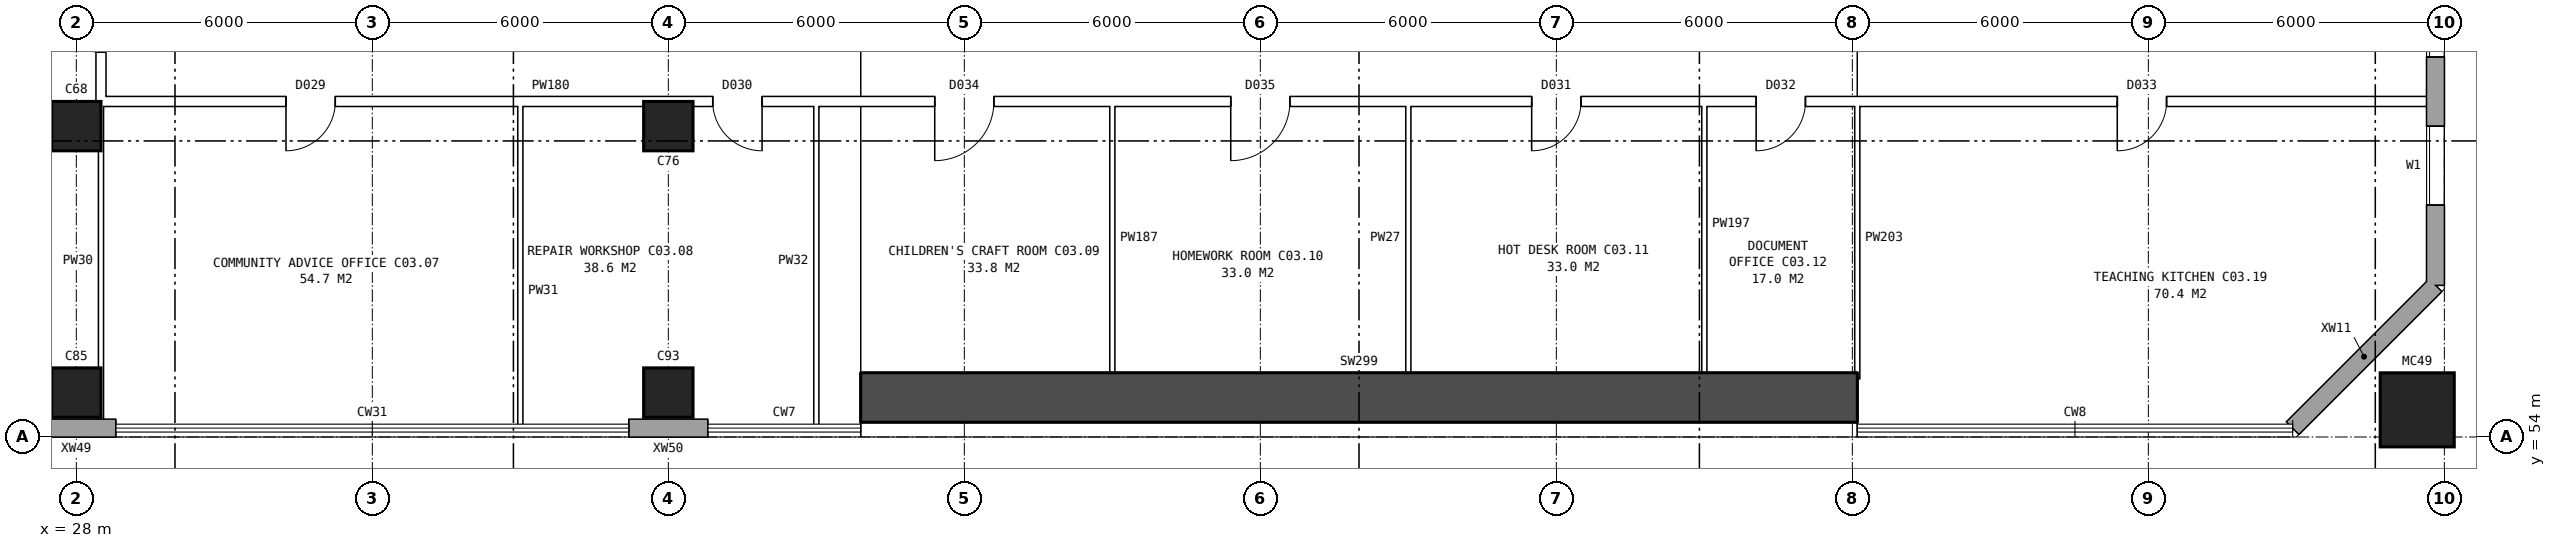
"""IFC4 building model, lengths in metres.
Left out: names, types, materials, properties, quantities, classifications, styles, units other than length and angle.
Written with IfcOpenShell. Run it as: python <this file> out.ifc"""

import sys

from ifc_helpers import new_model, si_unit, direction, frame, frame_2d, origin, origin_2d, place, context, subcontext, project, spatial, rectangle, hollow_rectangle, extrude, element, fill, save


model = new_model("IFC4")
c1 = context("Model", 3, precision=1e-05, world=origin(), true_north=direction((0.0, 1.0)))
c2 = subcontext(c1, "Body", "Model", "MODEL_VIEW")
j1 = project(units=[si_unit("LENGTHUNIT", "METRE"), si_unit("PLANEANGLEUNIT", "RADIAN")], contexts=[c1])
p1 = place(None, origin())
s1 = spatial("IfcSite", under=j1, at=p1, CompositionType="ELEMENT")
p2 = place(p1, origin())
s2 = spatial("IfcBuilding", under=s1, at=p2, CompositionType="ELEMENT")
p3 = place(p2, frame((0.0, 0.0, 14.7)))
s3 = spatial("IfcBuildingStorey", under=s2, at=p3, CompositionType="ELEMENT", Elevation=14.7)
p4 = place(p3, frame((43.9, 54.8, 0.0), z_axis=(0.0, 0.0, 1.0), x_axis=(1.0, 0.0, 0.0)))
e1 = element("IfcWall", 1, at=p4, inside=s3, PredefinedType="SHEAR", context=c2, shape_type="SweptSolid", body=[
    extrude(rectangle(XDim=20.2, YDim=1.0, at=frame_2d((10.1, 0.0))), origin(), (0.0, 0.0, 1.0), 4.0),
])
for number, where, z_axis, x_axis in (
    (2, (28.0, 54.9, 0.0), (0.0, 0.0, 1.0), (1.0, 0.0, 0.0)),
    (3, (28.0, 60.3, 0.0), (0.0, 0.0, 1.0), (1.0, 0.0, 0.0)),
    (4, (40.0, 54.9, 0.0), (0.0, 0.0, 1.0), (1.0, 0.0, 0.0)),
    (5, (40.0, 60.3, 0.0), (0.0, 0.0, 1.0), (1.0, 0.0, 0.0)),
):
    element("IfcColumn", number, at=place(p3, frame(where, z_axis=z_axis, x_axis=x_axis)), inside=s3, PredefinedType="COLUMN", context=c2, shape_type="SweptSolid", body=[
        extrude(rectangle(XDim=1.0, YDim=1.0, at=origin_2d()), origin(), (0.0, 0.0, 1.0), 4.0),
    ])
p5 = place(p3, frame((75.45, 54.55, 0.0), z_axis=(0.0, 0.0, 1.0), x_axis=(1.0, 0.0, 0.0)))
e6 = element("IfcColumn", 6, at=p5, inside=s3, PredefinedType="COLUMN", context=c2, shape_type="SweptSolid", body=[
    extrude(hollow_rectangle(XDim=1.5, YDim=1.5, WallThickness=0.08, at=origin_2d()), origin(), (0.0, 0.0, 1.0), 4.8),
])
for number, where, z_axis, x_axis in (
    (7, (27.2, 54.18, 0.0), (0.0, 0.0, 1.0), (1.0, 0.0, 0.0)),
    (8, (39.2, 54.18, 0.0), (0.0, 0.0, 1.0), (1.0, 0.0, 0.0)),
):
    element("IfcWall", number, at=place(p3, frame(where, z_axis=z_axis, x_axis=x_axis)), inside=s3, PredefinedType="STANDARD", context=c2, shape_type="SweptSolid", body=[
        extrude(rectangle(XDim=1.6, YDim=0.36, at=frame_2d((0.8, 0.0))), origin(), (0.0, 0.0, 1.0), 4.0),
    ])
p6 = place(p3, frame((72.925, 54.18, 0.0), z_axis=(0.0, 0.0, 1.0), x_axis=(0.707106781187, 0.707106781187, 0.0)))
e9 = element("IfcWall", 9, at=p6, inside=s3, PredefinedType="STANDARD", context=c2, shape_type="SweptSolid", body=[
    extrude(rectangle(XDim=4.094, YDim=0.36, at=frame_2d((2.047, 0.0))), origin(), (0.0, 0.0, 1.0), 4.0),
])
p7 = place(p3, frame((75.82, 57.075, 0.0), z_axis=(0.0, 0.0, 1.0), x_axis=(0.0, 1.0, 0.0)))
e10 = element("IfcWall", 10, at=p7, inside=s3, PredefinedType="STANDARD", context=c2, shape_type="SweptSolid", body=[
    extrude(rectangle(XDim=25.851, YDim=0.36, at=frame_2d((12.925, 0.0))), origin(), (0.0, 0.0, 1.0), 4.0),
])
p8 = place(p7, frame((1.625, 0.0, 0.8)))
e11 = element("IfcOpeningElement", 11, at=p8, cuts=e10, PredefinedType="OPENING", context=c2, shape_type="SweptSolid", body=[
    extrude(rectangle(XDim=1.6, YDim=1.8, at=frame_2d((0.8, 0.9))), frame((0.0, 0.19, 0.0), z_axis=(0.0, -1.0, 0.0), x_axis=(1.0, 0.0, 0.0)), (0.0, 0.0, 1.0), 0.38),
])
p9 = place(p7, frame((4.625, 0.0, 0.8)))
e12 = element("IfcOpeningElement", 12, at=p9, cuts=e10, PredefinedType="OPENING", context=c2, shape_type="SweptSolid", body=[
    extrude(rectangle(XDim=1.6, YDim=1.8, at=frame_2d((0.8, 0.9))), frame((0.0, 0.19, 0.0), z_axis=(0.0, -1.0, 0.0), x_axis=(1.0, 0.0, 0.0)), (0.0, 0.0, 1.0), 0.38),
])
p10 = place(p7, frame((19.625, 0.0, 0.8)))
e13 = element("IfcOpeningElement", 13, at=p10, cuts=e10, PredefinedType="OPENING", context=c2, shape_type="SweptSolid", body=[
    extrude(rectangle(XDim=1.6, YDim=1.8, at=frame_2d((0.8, 0.9))), frame((0.0, 0.19, 0.0), z_axis=(0.0, -1.0, 0.0), x_axis=(1.0, 0.0, 0.0)), (0.0, 0.0, 1.0), 0.38),
])
p11 = place(p7, frame((22.625, 0.0, 0.8)))
e14 = element("IfcOpeningElement", 14, at=p11, cuts=e10, PredefinedType="OPENING", context=c2, shape_type="SweptSolid", body=[
    extrude(rectangle(XDim=1.6, YDim=1.8, at=frame_2d((0.8, 0.9))), frame((0.0, 0.19, 0.0), z_axis=(0.0, -1.0, 0.0), x_axis=(1.0, 0.0, 0.0)), (0.0, 0.0, 1.0), 0.38),
])
p12 = place(p3, frame((28.4, 60.8, 0.0), z_axis=(0.0, 0.0, 1.0), x_axis=(1.0, 0.0, 0.0)))
e15 = element("IfcWall", 15, at=p12, inside=s3, PredefinedType="PARTITIONING", context=c2, shape_type="SweptSolid", body=[
    extrude(rectangle(XDim=47.36, YDim=0.2, at=frame_2d((23.68, 0.0))), origin(), (0.0, 0.0, 1.0), 4.0),
])
p13 = place(p12, frame((3.85, 0.0, 0.0)))
e16 = element("IfcOpeningElement", 16, at=p13, cuts=e15, PredefinedType="OPENING", context=c2, shape_type="SweptSolid", body=[
    extrude(rectangle(XDim=1.0, YDim=2.1, at=frame_2d((0.5, 1.05))), frame((0.0, 0.11, 0.0), z_axis=(0.0, -1.0, 0.0), x_axis=(1.0, 0.0, 0.0)), (0.0, 0.0, 1.0), 0.22),
])
p14 = place(p12, frame((12.5, 0.0, 0.0)))
e17 = element("IfcOpeningElement", 17, at=p14, cuts=e15, PredefinedType="OPENING", context=c2, shape_type="SweptSolid", body=[
    extrude(rectangle(XDim=1.0, YDim=2.1, at=frame_2d((0.5, 1.05))), frame((0.0, 0.11, 0.0), z_axis=(0.0, -1.0, 0.0), x_axis=(1.0, 0.0, 0.0)), (0.0, 0.0, 1.0), 0.22),
])
p15 = place(p12, frame((17.0, 0.0, 0.0)))
e18 = element("IfcOpeningElement", 18, at=p15, cuts=e15, PredefinedType="OPENING", context=c2, shape_type="SweptSolid", body=[
    extrude(rectangle(XDim=1.2, YDim=2.1, at=frame_2d((0.6, 1.05))), frame((0.0, 0.11, 0.0), z_axis=(0.0, -1.0, 0.0), x_axis=(1.0, 0.0, 0.0)), (0.0, 0.0, 1.0), 0.22),
])
p16 = place(p12, frame((23.0, 0.0, 0.0)))
e19 = element("IfcOpeningElement", 19, at=p16, cuts=e15, PredefinedType="OPENING", context=c2, shape_type="SweptSolid", body=[
    extrude(rectangle(XDim=1.2, YDim=2.1, at=frame_2d((0.6, 1.05))), frame((0.0, 0.11, 0.0), z_axis=(0.0, -1.0, 0.0), x_axis=(1.0, 0.0, 0.0)), (0.0, 0.0, 1.0), 0.22),
])
p17 = place(p12, frame((29.1, 0.0, 0.0)))
e20 = element("IfcOpeningElement", 20, at=p17, cuts=e15, PredefinedType="OPENING", context=c2, shape_type="SweptSolid", body=[
    extrude(rectangle(XDim=1.0, YDim=2.1, at=frame_2d((0.5, 1.05))), frame((0.0, 0.11, 0.0), z_axis=(0.0, -1.0, 0.0), x_axis=(1.0, 0.0, 0.0)), (0.0, 0.0, 1.0), 0.22),
])
p18 = place(p12, frame((33.65, 0.0, 0.0)))
e21 = element("IfcOpeningElement", 21, at=p18, cuts=e15, PredefinedType="OPENING", context=c2, shape_type="SweptSolid", body=[
    extrude(rectangle(XDim=1.0, YDim=2.1, at=frame_2d((0.5, 1.05))), frame((0.0, 0.11, 0.0), z_axis=(0.0, -1.0, 0.0), x_axis=(1.0, 0.0, 0.0)), (0.0, 0.0, 1.0), 0.22),
])
p19 = place(p12, frame((40.97, 0.0, 0.0)))
e22 = element("IfcOpeningElement", 22, at=p19, cuts=e15, PredefinedType="OPENING", context=c2, shape_type="SweptSolid", body=[
    extrude(rectangle(XDim=1.0, YDim=2.1, at=frame_2d((0.5, 1.05))), frame((0.0, 0.11, 0.0), z_axis=(0.0, -1.0, 0.0), x_axis=(1.0, 0.0, 0.0)), (0.0, 0.0, 1.0), 0.22),
])
p20 = place(p3, frame((28.5, 60.7, 0.0), z_axis=(0.0, 0.0, 1.0), x_axis=(0.0, 1.0, 0.0)))
e23 = element("IfcWall", 23, at=p20, inside=s3, PredefinedType="PARTITIONING", context=c2, shape_type="SweptSolid", body=[
    extrude(rectangle(XDim=18.6, YDim=0.2, at=frame_2d((9.3, 0.0))), origin(), (0.0, 0.0, 1.0), 4.0),
])
p21 = place(p20, frame((1.1, 0.0, 0.0)))
e24 = element("IfcOpeningElement", 24, at=p21, cuts=e23, PredefinedType="OPENING", context=c2, shape_type="SweptSolid", body=[
    extrude(rectangle(XDim=1.2, YDim=2.1, at=frame_2d((0.6, 1.05))), frame((0.0, 0.11, 0.0), z_axis=(0.0, -1.0, 0.0), x_axis=(1.0, 0.0, 0.0)), (0.0, 0.0, 1.0), 0.22),
])
p22 = place(p20, frame((7.2, 0.0, 0.0)))
e25 = element("IfcOpeningElement", 25, at=p22, cuts=e23, PredefinedType="OPENING", context=c2, shape_type="SweptSolid", body=[
    extrude(rectangle(XDim=1.2, YDim=2.1, at=frame_2d((0.6, 1.05))), frame((0.0, 0.11, 0.0), z_axis=(0.0, -1.0, 0.0), x_axis=(1.0, 0.0, 0.0)), (0.0, 0.0, 1.0), 0.22),
])
p23 = place(p20, frame((14.9, 0.0, 0.0)))
e26 = element("IfcOpeningElement", 26, at=p23, cuts=e23, PredefinedType="OPENING", context=c2, shape_type="SweptSolid", body=[
    extrude(rectangle(XDim=1.0, YDim=2.1, at=frame_2d((0.5, 1.05))), frame((0.0, 0.11, 0.0), z_axis=(0.0, -1.0, 0.0), x_axis=(1.0, 0.0, 0.0)), (0.0, 0.0, 1.0), 0.22),
])
for number, where, z_axis, x_axis in (
    (27, (28.5, 54.24, 0.0), (0.0, 0.0, 1.0), (0.0, 1.0, 0.0)),
    (28, (37.0, 54.24, 0.0), (0.0, 0.0, 1.0), (0.0, 1.0, 0.0)),
    (29, (43.0, 54.24, 0.0), (0.0, 0.0, 1.0), (0.0, 1.0, 0.0)),
):
    element("IfcWall", number, at=place(p3, frame(where, z_axis=z_axis, x_axis=x_axis)), inside=s3, PredefinedType="PARTITIONING", context=c2, shape_type="SweptSolid", body=[
        extrude(rectangle(XDim=6.66, YDim=0.1, at=frame_2d((3.33, 0.0))), origin(), (0.0, 0.0, 1.0), 4.0),
    ])
for number, where, z_axis, x_axis in (
    (30, (49.0, 55.18, 0.0), (0.0, 0.0, 1.0), (0.0, 1.0, 0.0)),
    (31, (55.0, 55.18, 0.0), (0.0, 0.0, 1.0), (0.0, 1.0, 0.0)),
    (32, (61.0, 55.18, 0.0), (0.0, 0.0, 1.0), (0.0, 1.0, 0.0)),
    (33, (64.1, 55.18, 0.0), (0.0, 0.0, 1.0), (0.0, 1.0, 0.0)),
):
    element("IfcWall", number, at=place(p3, frame(where, z_axis=z_axis, x_axis=x_axis)), inside=s3, PredefinedType="PARTITIONING", context=c2, shape_type="SweptSolid", body=[
        extrude(rectangle(XDim=5.72, YDim=0.1, at=frame_2d((2.86, 0.0))), origin(), (0.0, 0.0, 1.0), 4.0),
    ])
p24 = place(p8, origin())
e34 = element("IfcWindow", 34, at=p24, inside=s3, PartitioningType="SINGLE_PANEL", PredefinedType="WINDOW", context=c2, shape_type="SweptSolid", body=[
    extrude(rectangle(XDim=1.6, YDim=1.8, at=frame_2d((0.8, 0.9))), frame((0.0, 0.15, 0.0), z_axis=(0.0, -1.0, 0.0), x_axis=(1.0, 0.0, 0.0)), (0.0, 0.0, 1.0), 0.06),
])
fill(e11, e34)
p25 = place(p9, origin())
e35 = element("IfcWindow", 35, at=p25, inside=s3, PartitioningType="SINGLE_PANEL", PredefinedType="WINDOW", context=c2, shape_type="SweptSolid", body=[
    extrude(rectangle(XDim=1.6, YDim=1.8, at=frame_2d((0.8, 0.9))), frame((0.0, 0.15, 0.0), z_axis=(0.0, -1.0, 0.0), x_axis=(1.0, 0.0, 0.0)), (0.0, 0.0, 1.0), 0.06),
])
fill(e12, e35)
p26 = place(p13, frame((1.0, 0.0, 0.0), z_axis=(0.0, 0.0, 1.0), x_axis=(-1.0, 0.0, 0.0)))
e36 = element("IfcDoor", 36, at=p26, inside=s3, OperationType="SINGLE_SWING_RIGHT", PredefinedType="DOOR", context=c2, shape_type="SweptSolid", body=[
    extrude(rectangle(XDim=1.0, YDim=2.1, at=frame_2d((0.5, 1.05))), frame((0.0, 0.025, 0.0), z_axis=(0.0, -1.0, 0.0), x_axis=(1.0, 0.0, 0.0)), (0.0, 0.0, 1.0), 0.05),
])
fill(e16, e36)
p27 = place(p14, frame((1.0, 0.0, 0.0), z_axis=(0.0, 0.0, 1.0), x_axis=(-1.0, 0.0, 0.0)))
e37 = element("IfcDoor", 37, at=p27, inside=s3, OperationType="SINGLE_SWING_LEFT", PredefinedType="DOOR", context=c2, shape_type="SweptSolid", body=[
    extrude(rectangle(XDim=1.0, YDim=2.1, at=frame_2d((0.5, 1.05))), frame((0.0, 0.025, 0.0), z_axis=(0.0, -1.0, 0.0), x_axis=(1.0, 0.0, 0.0)), (0.0, 0.0, 1.0), 0.05),
])
fill(e17, e37)
p28 = place(p15, frame((1.2, 0.0, 0.0), z_axis=(0.0, 0.0, 1.0), x_axis=(-1.0, 0.0, 0.0)))
e38 = element("IfcDoor", 38, at=p28, inside=s3, OperationType="SINGLE_SWING_RIGHT", PredefinedType="DOOR", context=c2, shape_type="SweptSolid", body=[
    extrude(rectangle(XDim=1.2, YDim=2.1, at=frame_2d((0.6, 1.05))), frame((0.0, 0.025, 0.0), z_axis=(0.0, -1.0, 0.0), x_axis=(1.0, 0.0, 0.0)), (0.0, 0.0, 1.0), 0.05),
])
fill(e18, e38)
p29 = place(p16, frame((1.2, 0.0, 0.0), z_axis=(0.0, 0.0, 1.0), x_axis=(-1.0, 0.0, 0.0)))
e39 = element("IfcDoor", 39, at=p29, inside=s3, OperationType="SINGLE_SWING_RIGHT", PredefinedType="DOOR", context=c2, shape_type="SweptSolid", body=[
    extrude(rectangle(XDim=1.2, YDim=2.1, at=frame_2d((0.6, 1.05))), frame((0.0, 0.025, 0.0), z_axis=(0.0, -1.0, 0.0), x_axis=(1.0, 0.0, 0.0)), (0.0, 0.0, 1.0), 0.05),
])
fill(e19, e39)
p30 = place(p17, frame((1.0, 0.0, 0.0), z_axis=(0.0, 0.0, 1.0), x_axis=(-1.0, 0.0, 0.0)))
e40 = element("IfcDoor", 40, at=p30, inside=s3, OperationType="SINGLE_SWING_RIGHT", PredefinedType="DOOR", context=c2, shape_type="SweptSolid", body=[
    extrude(rectangle(XDim=1.0, YDim=2.1, at=frame_2d((0.5, 1.05))), frame((0.0, 0.025, 0.0), z_axis=(0.0, -1.0, 0.0), x_axis=(1.0, 0.0, 0.0)), (0.0, 0.0, 1.0), 0.05),
])
fill(e20, e40)
p31 = place(p18, frame((1.0, 0.0, 0.0), z_axis=(0.0, 0.0, 1.0), x_axis=(-1.0, 0.0, 0.0)))
e41 = element("IfcDoor", 41, at=p31, inside=s3, OperationType="SINGLE_SWING_RIGHT", PredefinedType="DOOR", context=c2, shape_type="SweptSolid", body=[
    extrude(rectangle(XDim=1.0, YDim=2.1, at=frame_2d((0.5, 1.05))), frame((0.0, 0.025, 0.0), z_axis=(0.0, -1.0, 0.0), x_axis=(1.0, 0.0, 0.0)), (0.0, 0.0, 1.0), 0.05),
])
fill(e21, e41)
p32 = place(p19, frame((1.0, 0.0, 0.0), z_axis=(0.0, 0.0, 1.0), x_axis=(-1.0, 0.0, 0.0)))
e42 = element("IfcDoor", 42, at=p32, inside=s3, OperationType="SINGLE_SWING_RIGHT", PredefinedType="DOOR", context=c2, shape_type="SweptSolid", body=[
    extrude(rectangle(XDim=1.0, YDim=2.1, at=frame_2d((0.5, 1.05))), frame((0.0, 0.025, 0.0), z_axis=(0.0, -1.0, 0.0), x_axis=(1.0, 0.0, 0.0)), (0.0, 0.0, 1.0), 0.05),
])
fill(e22, e42)
save(model, sys.argv[1])
